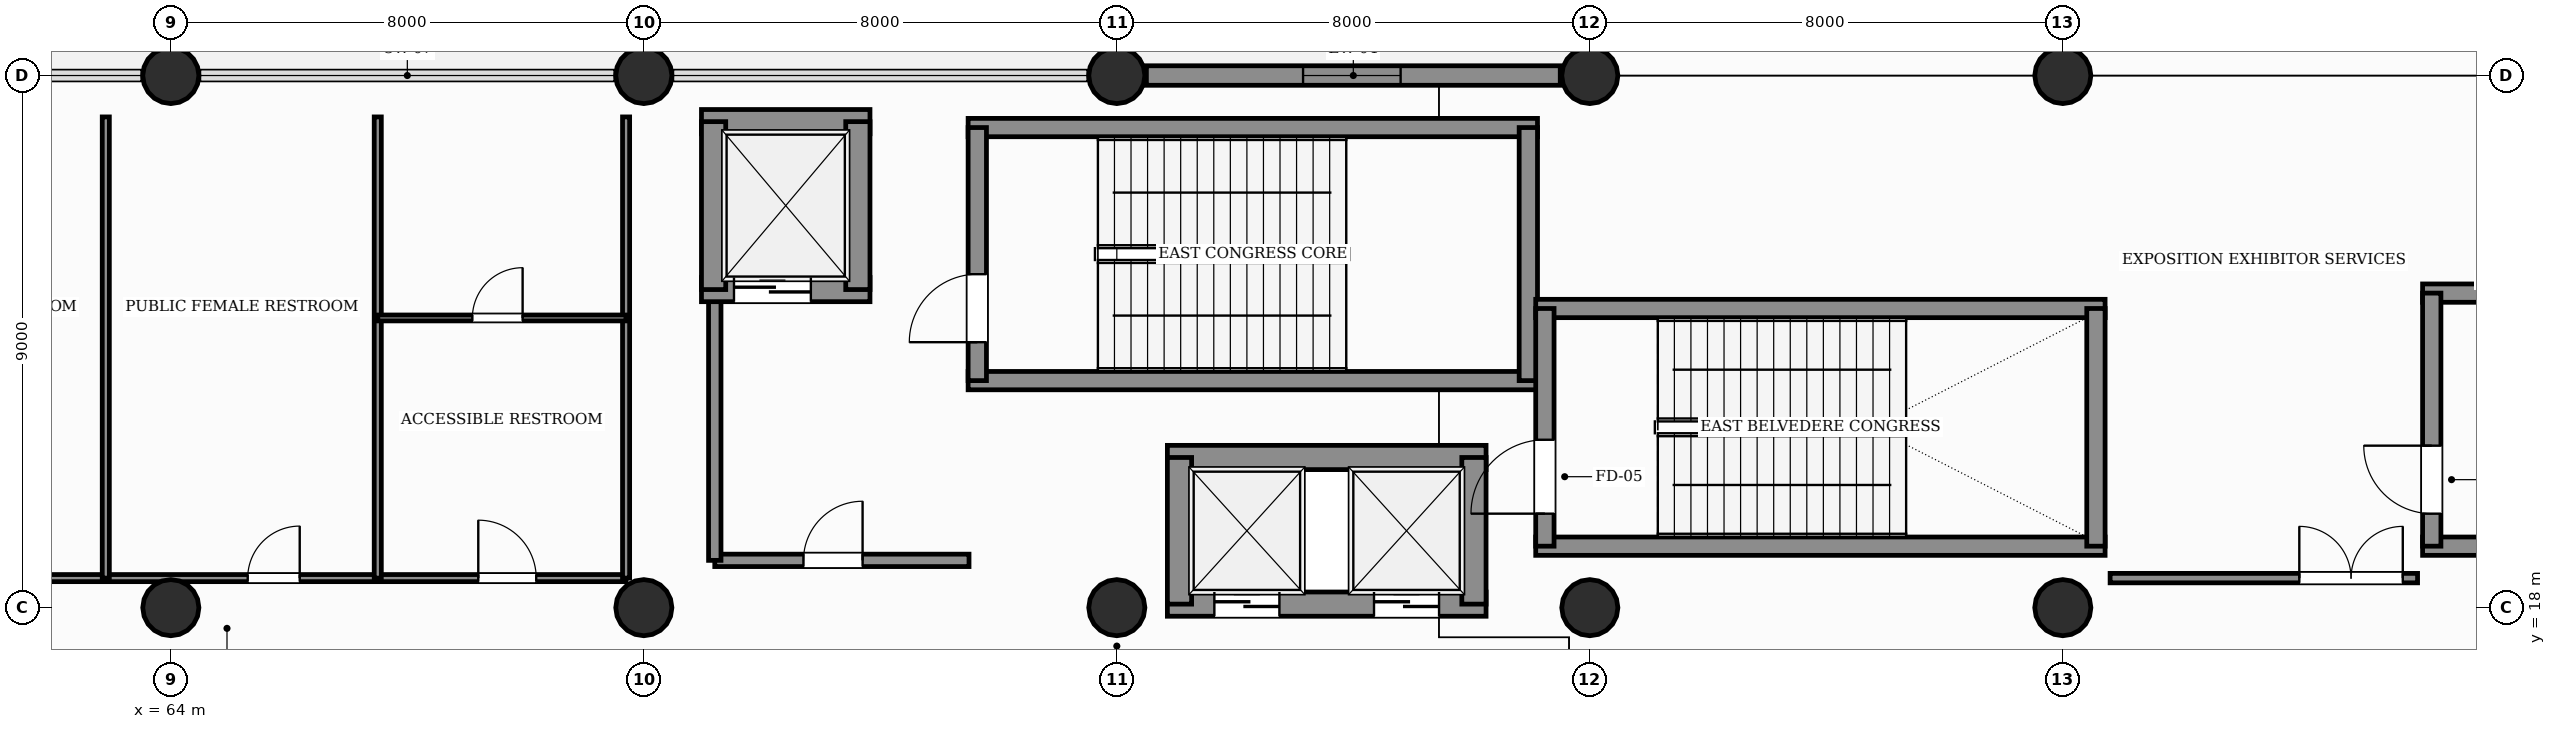
"""IFC4 building model, lengths in metres.
Left out: names, types, materials, properties, quantities, classifications, styles, units other than length and angle.
Written with IfcOpenShell. Run it as: python <this file> out.ifc"""

import sys

from ifc_helpers import new_model, si_unit, direction, frame, frame_2d, origin, origin_2d, place, context, subcontext, project, spatial, rectangle, circle, extrude, element, fill, save


model = new_model("IFC4")
c1 = context("Model", 3, precision=1e-05, world=origin(), true_north=direction((0.0, 1.0)))
c2 = subcontext(c1, "Body", "Model", "MODEL_VIEW")
j1 = project(units=[si_unit("LENGTHUNIT", "METRE"), si_unit("PLANEANGLEUNIT", "RADIAN")], contexts=[c1])
p1 = place(None, origin())
s1 = spatial("IfcSite", under=j1, at=p1, CompositionType="ELEMENT")
p2 = place(p1, origin())
s2 = spatial("IfcBuilding", under=s1, at=p2, CompositionType="ELEMENT")
p3 = place(p2, origin())
s3 = spatial("IfcBuildingStorey", under=s2, at=p3, CompositionType="ELEMENT", Elevation=0.0)
for number, where, z_axis, x_axis in (
    (1, (64.0, 18.0, 0.0), (0.0, 0.0, 1.0), (1.0, 0.0, 0.0)),
    (2, (64.0, 27.0, 0.0), (0.0, 0.0, 1.0), (1.0, 0.0, 0.0)),
    (3, (72.0, 18.0, 0.0), (0.0, 0.0, 1.0), (1.0, 0.0, 0.0)),
    (4, (72.0, 27.0, 0.0), (0.0, 0.0, 1.0), (1.0, 0.0, 0.0)),
    (5, (80.0, 18.0, 0.0), (0.0, 0.0, 1.0), (1.0, 0.0, 0.0)),
    (6, (80.0, 27.0, 0.0), (0.0, 0.0, 1.0), (1.0, 0.0, 0.0)),
    (7, (88.0, 18.0, 0.0), (0.0, 0.0, 1.0), (1.0, 0.0, 0.0)),
    (8, (88.0, 27.0, 0.0), (0.0, 0.0, 1.0), (1.0, 0.0, 0.0)),
    (9, (96.0, 18.0, 0.0), (0.0, 0.0, 1.0), (1.0, 0.0, 0.0)),
    (10, (96.0, 27.0, 0.0), (0.0, 0.0, 1.0), (1.0, 0.0, 0.0)),
):
    element("IfcColumn", number, at=place(p3, frame(where, z_axis=z_axis, x_axis=x_axis)), inside=s3, PredefinedType="COLUMN", context=c2, shape_type="SweptSolid", body=[
        extrude(circle(Radius=0.475, at=origin_2d()), origin(), (0.0, 0.0, 1.0), 6.0),
    ])
p4 = place(p3, frame((80.5, 27.0, 0.0), z_axis=(0.0, 0.0, 1.0), x_axis=(1.0, 0.0, 0.0)))
e11 = element("IfcWall", 11, at=p4, inside=s3, PredefinedType="SOLIDWALL", context=c2, shape_type="SweptSolid", body=[
    extrude(rectangle(XDim=7.0, YDim=0.33, at=frame_2d((3.5, 0.0))), origin(), (0.0, 0.0, 1.0), 4.7),
])
p5 = place(p4, frame((2.65, 0.0, 0.95)))
e12 = element("IfcOpeningElement", 12, at=p5, cuts=e11, PredefinedType="OPENING", context=c2, shape_type="SweptSolid", body=[
    extrude(rectangle(XDim=1.65, YDim=2.1, at=frame_2d((0.825, 1.05))), frame((0.0, 0.175, 0.0), z_axis=(0.0, -1.0, 0.0), x_axis=(1.0, 0.0, 0.0)), (0.0, 0.0, 1.0), 0.35),
])
for number, where, z_axis, x_axis in (
    (13, (77.485, 21.84, 0.0), (0.0, 0.0, 1.0), (1.0, 0.0, 0.0)),
    (14, (77.485, 26.12, 0.0), (0.0, 0.0, 1.0), (1.0, 0.0, 0.0)),
):
    element("IfcWall", number, at=place(p3, frame(where, z_axis=z_axis, x_axis=x_axis)), inside=s3, PredefinedType="SHEAR", context=c2, shape_type="SweptSolid", body=[
        extrude(rectangle(XDim=9.63, YDim=0.31, at=frame_2d((4.815, 0.0))), origin(), (0.0, 0.0, 1.0), 6.0),
    ])
p6 = place(p3, frame((77.64, 21.84, 0.0), z_axis=(0.0, 0.0, 1.0), x_axis=(0.0, 1.0, 0.0)))
e15 = element("IfcWall", 15, at=p6, inside=s3, PredefinedType="SHEAR", context=c2, shape_type="SweptSolid", body=[
    extrude(rectangle(XDim=4.28, YDim=0.31, at=frame_2d((2.14, 0.0))), origin(), (0.0, 0.0, 1.0), 6.0),
])
p7 = place(p6, frame((0.65, 0.0, 0.0)))
e16 = element("IfcOpeningElement", 16, at=p7, cuts=e15, PredefinedType="OPENING", context=c2, shape_type="SweptSolid", body=[
    extrude(rectangle(XDim=1.15, YDim=2.2, at=frame_2d((0.575, 1.1))), frame((0.0, 0.165, 0.0), z_axis=(0.0, -1.0, 0.0), x_axis=(1.0, 0.0, 0.0)), (0.0, 0.0, 1.0), 0.33),
])
p8 = place(p3, frame((86.96, 21.84, 0.0), z_axis=(0.0, 0.0, 1.0), x_axis=(0.0, 1.0, 0.0)))
e17 = element("IfcWall", 17, at=p8, inside=s3, PredefinedType="SHEAR", context=c2, shape_type="SweptSolid", body=[
    extrude(rectangle(XDim=4.28, YDim=0.31, at=frame_2d((2.14, 0.0))), origin(), (0.0, 0.0, 1.0), 6.0),
])
p9 = place(p3, frame((73.2, 18.8, 0.0), z_axis=(0.0, 0.0, 1.0), x_axis=(1.0, 0.0, 0.0)))
e18 = element("IfcWall", 18, at=p9, inside=s3, PredefinedType="PARTITIONING", context=c2, shape_type="SweptSolid", body=[
    extrude(rectangle(XDim=4.3, YDim=0.21, at=frame_2d((2.15, 0.0))), origin(), (0.0, 0.0, 1.0), 4.65),
])
p10 = place(p9, frame((1.5, 0.0, 0.0)))
e19 = element("IfcOpeningElement", 19, at=p10, cuts=e18, PredefinedType="OPENING", context=c2, shape_type="SweptSolid", body=[
    extrude(rectangle(XDim=1.0, YDim=2.15, at=frame_2d((0.5, 1.075))), frame((0.0, 0.115, 0.0), z_axis=(0.0, -1.0, 0.0), x_axis=(1.0, 0.0, 0.0)), (0.0, 0.0, 1.0), 0.23),
])
p11 = place(p3, frame((73.2, 18.8, 0.0), z_axis=(0.0, 0.0, 1.0), x_axis=(0.0, 1.0, 0.0)))
e20 = element("IfcWall", 20, at=p11, inside=s3, PredefinedType="PARTITIONING", context=c2, shape_type="SweptSolid", body=[
    extrude(rectangle(XDim=4.6, YDim=0.21, at=frame_2d((2.3, 0.0))), origin(), (0.0, 0.0, 1.0), 4.65),
])
p12 = place(p3, frame((72.975, 23.38, 0.0), z_axis=(0.0, 0.0, 1.0), x_axis=(1.0, 0.0, 0.0)))
e21 = element("IfcWall", 21, at=p12, inside=s3, PredefinedType="SHEAR", context=c2, shape_type="SweptSolid", body=[
    extrude(rectangle(XDim=2.85, YDim=0.41, at=frame_2d((1.425, 0.0))), origin(), (0.0, 0.0, 1.0), 6.0),
])
p13 = place(p12, frame((0.55, 0.0, 0.0)))
e22 = element("IfcOpeningElement", 22, at=p13, cuts=e21, PredefinedType="OPENING", context=c2, shape_type="SweptSolid", body=[
    extrude(rectangle(XDim=1.3, YDim=2.25, at=frame_2d((0.65, 1.125))), frame((0.0, 0.215, 0.0), z_axis=(0.0, -1.0, 0.0), x_axis=(1.0, 0.0, 0.0)), (0.0, 0.0, 1.0), 0.43),
])
p14 = place(p3, frame((72.975, 26.22, 0.0), z_axis=(0.0, 0.0, 1.0), x_axis=(1.0, 0.0, 0.0)))
e23 = element("IfcWall", 23, at=p14, inside=s3, PredefinedType="SHEAR", context=c2, shape_type="SweptSolid", body=[
    extrude(rectangle(XDim=2.85, YDim=0.41, at=frame_2d((1.425, 0.0))), origin(), (0.0, 0.0, 1.0), 6.0),
])
for number, where, z_axis, x_axis in (
    (24, (73.18, 23.38, 0.0), (0.0, 0.0, 1.0), (0.0, 1.0, 0.0)),
    (25, (75.62, 23.38, 0.0), (0.0, 0.0, 1.0), (0.0, 1.0, 0.0)),
):
    element("IfcWall", number, at=place(p3, frame(where, z_axis=z_axis, x_axis=x_axis)), inside=s3, PredefinedType="SHEAR", context=c2, shape_type="SweptSolid", body=[
        extrude(rectangle(XDim=2.84, YDim=0.41, at=frame_2d((1.42, 0.0))), origin(), (0.0, 0.0, 1.0), 6.0),
    ])
p15 = place(p3, frame((80.855, 18.06, 0.0), z_axis=(0.0, 0.0, 1.0), x_axis=(1.0, 0.0, 0.0)))
e26 = element("IfcWall", 26, at=p15, inside=s3, PredefinedType="SHEAR", context=c2, shape_type="SweptSolid", body=[
    extrude(rectangle(XDim=5.39, YDim=0.41, at=frame_2d((2.695, 0.0))), origin(), (0.0, 0.0, 1.0), 6.0),
])
p16 = place(p15, frame((0.795, 0.0, 0.0)))
e27 = element("IfcOpeningElement", 27, at=p16, cuts=e26, PredefinedType="OPENING", context=c2, shape_type="SweptSolid", body=[
    extrude(rectangle(XDim=1.1, YDim=2.2, at=frame_2d((0.55, 1.1))), frame((0.0, 0.215, 0.0), z_axis=(0.0, -1.0, 0.0), x_axis=(1.0, 0.0, 0.0)), (0.0, 0.0, 1.0), 0.43),
])
p17 = place(p15, frame((3.495, 0.0, 0.0)))
e28 = element("IfcOpeningElement", 28, at=p17, cuts=e26, PredefinedType="OPENING", context=c2, shape_type="SweptSolid", body=[
    extrude(rectangle(XDim=1.1, YDim=2.2, at=frame_2d((0.55, 1.1))), frame((0.0, 0.215, 0.0), z_axis=(0.0, -1.0, 0.0), x_axis=(1.0, 0.0, 0.0)), (0.0, 0.0, 1.0), 0.43),
])
p18 = place(p3, frame((80.855, 20.54, 0.0), z_axis=(0.0, 0.0, 1.0), x_axis=(1.0, 0.0, 0.0)))
e29 = element("IfcWall", 29, at=p18, inside=s3, PredefinedType="SHEAR", context=c2, shape_type="SweptSolid", body=[
    extrude(rectangle(XDim=5.39, YDim=0.41, at=frame_2d((2.695, 0.0))), origin(), (0.0, 0.0, 1.0), 6.0),
])
for number, where, z_axis, x_axis in (
    (30, (81.06, 18.06, 0.0), (0.0, 0.0, 1.0), (0.0, 1.0, 0.0)),
    (31, (86.04, 18.06, 0.0), (0.0, 0.0, 1.0), (0.0, 1.0, 0.0)),
):
    element("IfcWall", number, at=place(p3, frame(where, z_axis=z_axis, x_axis=x_axis)), inside=s3, PredefinedType="SHEAR", context=c2, shape_type="SweptSolid", body=[
        extrude(rectangle(XDim=2.48, YDim=0.41, at=frame_2d((1.24, 0.0))), origin(), (0.0, 0.0, 1.0), 6.0),
    ])
for number, where, z_axis, x_axis in (
    (32, (102.085, 19.04, 0.0), (0.0, 0.0, 1.0), (1.0, 0.0, 0.0)),
    (33, (102.085, 23.32, 0.0), (0.0, 0.0, 1.0), (1.0, 0.0, 0.0)),
):
    element("IfcWall", number, at=place(p3, frame(where, z_axis=z_axis, x_axis=x_axis)), inside=s3, PredefinedType="SHEAR", context=c2, shape_type="SweptSolid", body=[
        extrude(rectangle(XDim=9.63, YDim=0.31, at=frame_2d((4.815, 0.0))), origin(), (0.0, 0.0, 1.0), 6.0),
    ])
p19 = place(p3, frame((102.24, 19.04, 0.0), z_axis=(0.0, 0.0, 1.0), x_axis=(0.0, 1.0, 0.0)))
e34 = element("IfcWall", 34, at=p19, inside=s3, PredefinedType="SHEAR", context=c2, shape_type="SweptSolid", body=[
    extrude(rectangle(XDim=4.28, YDim=0.31, at=frame_2d((2.14, 0.0))), origin(), (0.0, 0.0, 1.0), 6.0),
])
p20 = place(p19, frame((0.55, 0.0, 0.0)))
e35 = element("IfcOpeningElement", 35, at=p20, cuts=e34, PredefinedType="OPENING", context=c2, shape_type="SweptSolid", body=[
    extrude(rectangle(XDim=1.15, YDim=2.2, at=frame_2d((0.575, 1.1))), frame((0.0, 0.165, 0.0), z_axis=(0.0, -1.0, 0.0), x_axis=(1.0, 0.0, 0.0)), (0.0, 0.0, 1.0), 0.33),
])
for number, where, z_axis, x_axis in (
    (36, (87.085, 19.04, 0.0), (0.0, 0.0, 1.0), (1.0, 0.0, 0.0)),
    (37, (87.085, 23.06, 0.0), (0.0, 0.0, 1.0), (1.0, 0.0, 0.0)),
):
    element("IfcWall", number, at=place(p3, frame(where, z_axis=z_axis, x_axis=x_axis)), inside=s3, PredefinedType="SHEAR", context=c2, shape_type="SweptSolid", body=[
        extrude(rectangle(XDim=9.63, YDim=0.31, at=frame_2d((4.815, 0.0))), origin(), (0.0, 0.0, 1.0), 6.0),
    ])
p21 = place(p3, frame((87.24, 19.04, 0.0), z_axis=(0.0, 0.0, 1.0), x_axis=(0.0, 1.0, 0.0)))
e38 = element("IfcWall", 38, at=p21, inside=s3, PredefinedType="SHEAR", context=c2, shape_type="SweptSolid", body=[
    extrude(rectangle(XDim=4.02, YDim=0.31, at=frame_2d((2.01, 0.0))), origin(), (0.0, 0.0, 1.0), 6.0),
])
p22 = place(p21, frame((0.55, 0.0, 0.0)))
e39 = element("IfcOpeningElement", 39, at=p22, cuts=e38, PredefinedType="OPENING", context=c2, shape_type="SweptSolid", body=[
    extrude(rectangle(XDim=1.25, YDim=2.2, at=frame_2d((0.625, 1.1))), frame((0.0, 0.165, 0.0), z_axis=(0.0, -1.0, 0.0), x_axis=(1.0, 0.0, 0.0)), (0.0, 0.0, 1.0), 0.33),
])
p23 = place(p3, frame((96.56, 19.04, 0.0), z_axis=(0.0, 0.0, 1.0), x_axis=(0.0, 1.0, 0.0)))
e40 = element("IfcWall", 40, at=p23, inside=s3, PredefinedType="SHEAR", context=c2, shape_type="SweptSolid", body=[
    extrude(rectangle(XDim=4.02, YDim=0.31, at=frame_2d((2.01, 0.0))), origin(), (0.0, 0.0, 1.0), 6.0),
])
p24 = place(p3, frame((58.3, 18.5, 0.0), z_axis=(0.0, 0.0, 1.0), x_axis=(1.0, 0.0, 0.0)))
e41 = element("IfcWall", 41, at=p24, inside=s3, PredefinedType="PARTITIONING", context=c2, shape_type="SweptSolid", body=[
    extrude(rectangle(XDim=13.4, YDim=0.12, at=frame_2d((6.7, 0.0))), origin(), (0.0, 0.0, 1.0), 4.65),
])
p25 = place(p24, frame((1.8, 0.0, 0.0)))
e42 = element("IfcOpeningElement", 42, at=p25, cuts=e41, PredefinedType="OPENING", context=c2, shape_type="SweptSolid", body=[
    extrude(rectangle(XDim=0.88, YDim=2.1, at=frame_2d((0.44, 1.05))), frame((0.0, 0.07, 0.0), z_axis=(0.0, -1.0, 0.0), x_axis=(1.0, 0.0, 0.0)), (0.0, 0.0, 1.0), 0.14),
])
p26 = place(p24, frame((7.0, 0.0, 0.0)))
e43 = element("IfcOpeningElement", 43, at=p26, cuts=e41, PredefinedType="OPENING", context=c2, shape_type="SweptSolid", body=[
    extrude(rectangle(XDim=0.88, YDim=2.1, at=frame_2d((0.44, 1.05))), frame((0.0, 0.07, 0.0), z_axis=(0.0, -1.0, 0.0), x_axis=(1.0, 0.0, 0.0)), (0.0, 0.0, 1.0), 0.14),
])
p27 = place(p24, frame((10.9, 0.0, 0.0)))
e44 = element("IfcOpeningElement", 44, at=p27, cuts=e41, PredefinedType="OPENING", context=c2, shape_type="SweptSolid", body=[
    extrude(rectangle(XDim=0.98, YDim=2.15, at=frame_2d((0.49, 1.075))), frame((0.0, 0.07, 0.0), z_axis=(0.0, -1.0, 0.0), x_axis=(1.0, 0.0, 0.0)), (0.0, 0.0, 1.0), 0.14),
])
for number, where, z_axis, x_axis in (
    (45, (62.9, 18.5, 0.0), (0.0, 0.0, 1.0), (0.0, 1.0, 0.0)),
    (46, (67.5, 18.5, 0.0), (0.0, 0.0, 1.0), (0.0, 1.0, 0.0)),
    (47, (71.7, 18.5, 0.0), (0.0, 0.0, 1.0), (0.0, 1.0, 0.0)),
):
    element("IfcWall", number, at=place(p3, frame(where, z_axis=z_axis, x_axis=x_axis)), inside=s3, PredefinedType="PARTITIONING", context=c2, shape_type="SweptSolid", body=[
        extrude(rectangle(XDim=7.8, YDim=0.12, at=frame_2d((3.9, 0.0))), origin(), (0.0, 0.0, 1.0), 4.65),
    ])
p28 = place(p3, frame((67.5, 22.9, 0.0), z_axis=(0.0, 0.0, 1.0), x_axis=(1.0, 0.0, 0.0)))
e48 = element("IfcWall", 48, at=p28, inside=s3, PredefinedType="PARTITIONING", context=c2, shape_type="SweptSolid", body=[
    extrude(rectangle(XDim=4.2, YDim=0.1, at=frame_2d((2.1, 0.0))), origin(), (0.0, 0.0, 1.0), 4.65),
])
p29 = place(p28, frame((1.6, 0.0, 0.0)))
e49 = element("IfcOpeningElement", 49, at=p29, cuts=e48, PredefinedType="OPENING", context=c2, shape_type="SweptSolid", body=[
    extrude(rectangle(XDim=0.85, YDim=2.1, at=frame_2d((0.425, 1.05))), frame((0.0, 0.06, 0.0), z_axis=(0.0, -1.0, 0.0), x_axis=(1.0, 0.0, 0.0)), (0.0, 0.0, 1.0), 0.12),
])
p30 = place(p3, frame((96.8, 18.5, 0.0), z_axis=(0.0, 0.0, 1.0), x_axis=(1.0, 0.0, 0.0)))
e50 = element("IfcWall", 50, at=p30, inside=s3, PredefinedType="PARTITIONING", context=c2, shape_type="SweptSolid", body=[
    extrude(rectangle(XDim=5.2, YDim=0.16, at=frame_2d((2.6, 0.0))), origin(), (0.0, 0.0, 1.0), 4.65),
])
p31 = place(p30, frame((3.2, 0.0, 0.0)))
e51 = element("IfcOpeningElement", 51, at=p31, cuts=e50, PredefinedType="OPENING", context=c2, shape_type="SweptSolid", body=[
    extrude(rectangle(XDim=1.75, YDim=2.35, at=frame_2d((0.875, 1.175))), frame((0.0, 0.09, 0.0), z_axis=(0.0, -1.0, 0.0), x_axis=(1.0, 0.0, 0.0)), (0.0, 0.0, 1.0), 0.18),
])
p32 = place(p5, origin())
e52 = element("IfcWindow", 52, at=p32, inside=s3, PartitioningType="SINGLE_PANEL", PredefinedType="WINDOW", context=c2, shape_type="SweptSolid", body=[
    extrude(rectangle(XDim=1.65, YDim=2.1, at=frame_2d((0.825, 1.05))), frame((0.0, 0.03, 0.0), z_axis=(0.0, -1.0, 0.0), x_axis=(1.0, 0.0, 0.0)), (0.0, 0.0, 1.0), 0.06),
])
fill(e12, e52)
p33 = place(p7, origin())
e53 = element("IfcDoor", 53, at=p33, inside=s3, OperationType="SINGLE_SWING_LEFT", PredefinedType="DOOR", context=c2, shape_type="SweptSolid", body=[
    extrude(rectangle(XDim=1.15, YDim=2.2, at=frame_2d((0.575, 1.1))), frame((0.0, 0.025, 0.0), z_axis=(0.0, -1.0, 0.0), x_axis=(1.0, 0.0, 0.0)), (0.0, 0.0, 1.0), 0.05),
])
fill(e16, e53)
p34 = place(p10, origin())
e54 = element("IfcDoor", 54, at=p34, inside=s3, OperationType="SINGLE_SWING_RIGHT", PredefinedType="DOOR", context=c2, shape_type="SweptSolid", body=[
    extrude(rectangle(XDim=1.0, YDim=2.15, at=frame_2d((0.5, 1.075))), frame((0.0, 0.025, 0.0), z_axis=(0.0, -1.0, 0.0), x_axis=(1.0, 0.0, 0.0)), (0.0, 0.0, 1.0), 0.05),
])
fill(e19, e54)
p35 = place(p13, origin())
e55 = element("IfcDoor", 55, at=p35, inside=s3, OperationType="DOUBLE_DOOR_SLIDING", PredefinedType="DOOR", context=c2, shape_type="SweptSolid", body=[
    extrude(rectangle(XDim=1.3, YDim=2.25, at=frame_2d((0.65, 1.125))), frame((0.0, 0.025, 0.0), z_axis=(0.0, -1.0, 0.0), x_axis=(1.0, 0.0, 0.0)), (0.0, 0.0, 1.0), 0.05),
])
fill(e22, e55)
p36 = place(p16, origin())
e56 = element("IfcDoor", 56, at=p36, inside=s3, OperationType="DOUBLE_DOOR_SLIDING", PredefinedType="DOOR", context=c2, shape_type="SweptSolid", body=[
    extrude(rectangle(XDim=1.1, YDim=2.2, at=frame_2d((0.55, 1.1))), frame((0.0, 0.025, 0.0), z_axis=(0.0, -1.0, 0.0), x_axis=(1.0, 0.0, 0.0)), (0.0, 0.0, 1.0), 0.05),
])
fill(e27, e56)
p37 = place(p17, origin())
e57 = element("IfcDoor", 57, at=p37, inside=s3, OperationType="DOUBLE_DOOR_SLIDING", PredefinedType="DOOR", context=c2, shape_type="SweptSolid", body=[
    extrude(rectangle(XDim=1.1, YDim=2.2, at=frame_2d((0.55, 1.1))), frame((0.0, 0.025, 0.0), z_axis=(0.0, -1.0, 0.0), x_axis=(1.0, 0.0, 0.0)), (0.0, 0.0, 1.0), 0.05),
])
fill(e28, e57)
p38 = place(p20, origin())
e58 = element("IfcDoor", 58, at=p38, inside=s3, OperationType="SINGLE_SWING_RIGHT", PredefinedType="DOOR", context=c2, shape_type="SweptSolid", body=[
    extrude(rectangle(XDim=1.15, YDim=2.2, at=frame_2d((0.575, 1.1))), frame((0.0, 0.025, 0.0), z_axis=(0.0, -1.0, 0.0), x_axis=(1.0, 0.0, 0.0)), (0.0, 0.0, 1.0), 0.05),
])
fill(e35, e58)
p39 = place(p22, origin())
e59 = element("IfcDoor", 59, at=p39, inside=s3, OperationType="SINGLE_SWING_LEFT", PredefinedType="DOOR", context=c2, shape_type="SweptSolid", body=[
    extrude(rectangle(XDim=1.25, YDim=2.2, at=frame_2d((0.625, 1.1))), frame((0.0, 0.025, 0.0), z_axis=(0.0, -1.0, 0.0), x_axis=(1.0, 0.0, 0.0)), (0.0, 0.0, 1.0), 0.05),
])
fill(e39, e59)
p40 = place(p26, origin())
e60 = element("IfcDoor", 60, at=p40, inside=s3, OperationType="SINGLE_SWING_RIGHT", PredefinedType="DOOR", context=c2, shape_type="SweptSolid", body=[
    extrude(rectangle(XDim=0.88, YDim=2.1, at=frame_2d((0.44, 1.05))), frame((0.0, 0.025, 0.0), z_axis=(0.0, -1.0, 0.0), x_axis=(1.0, 0.0, 0.0)), (0.0, 0.0, 1.0), 0.05),
])
fill(e43, e60)
p41 = place(p27, origin())
e61 = element("IfcDoor", 61, at=p41, inside=s3, OperationType="SINGLE_SWING_LEFT", PredefinedType="DOOR", context=c2, shape_type="SweptSolid", body=[
    extrude(rectangle(XDim=0.98, YDim=2.15, at=frame_2d((0.49, 1.075))), frame((0.0, 0.025, 0.0), z_axis=(0.0, -1.0, 0.0), x_axis=(1.0, 0.0, 0.0)), (0.0, 0.0, 1.0), 0.05),
])
fill(e44, e61)
p42 = place(p29, origin())
e62 = element("IfcDoor", 62, at=p42, inside=s3, OperationType="SINGLE_SWING_RIGHT", PredefinedType="DOOR", context=c2, shape_type="SweptSolid", body=[
    extrude(rectangle(XDim=0.85, YDim=2.1, at=frame_2d((0.425, 1.05))), frame((0.0, 0.025, 0.0), z_axis=(0.0, -1.0, 0.0), x_axis=(1.0, 0.0, 0.0)), (0.0, 0.0, 1.0), 0.05),
])
fill(e49, e62)
p43 = place(p31, origin())
e63 = element("IfcDoor", 63, at=p43, inside=s3, OperationType="DOUBLE_DOOR_SINGLE_SWING", PredefinedType="DOOR", context=c2, shape_type="SweptSolid", body=[
    extrude(rectangle(XDim=1.75, YDim=2.35, at=frame_2d((0.875, 1.175))), frame((0.0, 0.025, 0.0), z_axis=(0.0, -1.0, 0.0), x_axis=(1.0, 0.0, 0.0)), (0.0, 0.0, 1.0), 0.05),
])
fill(e51, e63)
save(model, sys.argv[1])
